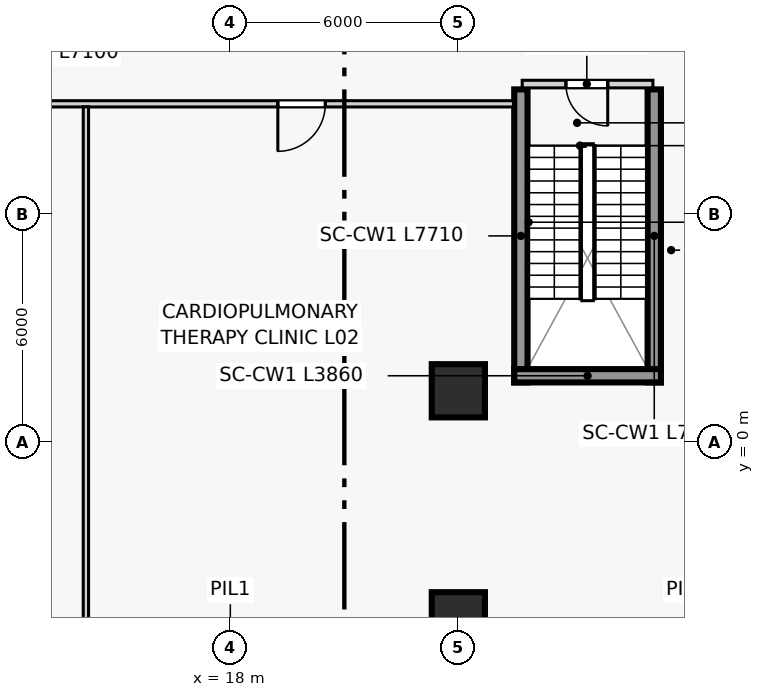
"""IFC4 building model, lengths in metres.
Left out: names, types, materials, properties, quantities, classifications, styles, units other than length and angle.
Written with IfcOpenShell. Run it as: python <this file> out.ifc"""

import sys

from ifc_helpers import new_model, si_unit, direction, frame, frame_2d, origin, origin_2d, place, context, subcontext, project, spatial, rectangle, extrude, source, transform, mapped, element, fill, save


model = new_model("IFC4")
c1 = context("Model", 3, precision=1e-05, world=origin(), true_north=direction((0.0, 1.0)))
c2 = subcontext(c1, "Body", "Model", "MODEL_VIEW")
j1 = project(units=[si_unit("LENGTHUNIT", "METRE"), si_unit("PLANEANGLEUNIT", "RADIAN")], contexts=[c1])
p1 = place(None, origin())
s1 = spatial("IfcSite", under=j1, at=p1, CompositionType="ELEMENT")
p2 = place(p1, origin())
s2 = spatial("IfcBuilding", under=s1, at=p2, CompositionType="ELEMENT")
p3 = place(p2, frame((0.0, 0.0, 9.0)))
s3 = spatial("IfcBuildingStorey", under=s2, at=p3, CompositionType="ELEMENT", Elevation=9.0)
for number, where, z_axis, x_axis in (
    (1, (25.645, 1.57, 0.0), (0.0, 0.0, 1.0), (0.0, 1.0, 0.0)),
    (2, (29.155, 1.57, 0.0), (0.0, 0.0, 1.0), (0.0, 1.0, 0.0)),
):
    element("IfcWall", number, at=place(p3, frame(where, z_axis=z_axis, x_axis=x_axis)), inside=s3, PredefinedType="SHEAR", context=c2, shape_type="SweptSolid", body=[
        extrude(rectangle(XDim=7.71, YDim=0.35, at=frame_2d((3.855, 0.0))), origin(), (0.0, 0.0, 1.0), 4.5),
    ])
p4 = place(p3, frame((25.47, 1.745, 0.0), z_axis=(0.0, 0.0, 1.0), x_axis=(1.0, 0.0, 0.0)))
e3 = element("IfcWall", 3, at=p4, inside=s3, PredefinedType="SHEAR", context=c2, shape_type="SweptSolid", body=[
    extrude(rectangle(XDim=3.86, YDim=0.35, at=frame_2d((1.93, 0.0))), origin(), (0.0, 0.0, 1.0), 4.5),
])
m1 = source(origin(), c2, "Body", "SweptSolid", [
    extrude(rectangle(XDim=1.4, YDim=1.4, at=origin_2d()), origin(), (0.0, 0.0, 1.0), 4.5),
])
for number, where, z_axis, x_axis in (
    (4, (24.0, -4.65, 0.0), (0.0, 0.0, 1.0), (1.0, 0.0, 0.0)),
    (5, (24.0, 1.35, 0.0), (0.0, 0.0, 1.0), (1.0, 0.0, 0.0)),
):
    element("IfcColumn", number, at=place(p3, frame(where, z_axis=z_axis, x_axis=x_axis)), inside=s3, PredefinedType="COLUMN", context=c2, shape_type="MappedRepresentation", body=[
        mapped(m1, transform((0.0, 0.0, 0.0), scale=1.0)),
    ])
p5 = place(p3, frame((25.68, 9.42, 0.0), z_axis=(0.0, 0.0, 1.0), x_axis=(1.0, 0.0, 0.0)))
e6 = element("IfcWall", 6, at=p5, inside=s3, PredefinedType="PARTITIONING", context=c2, shape_type="SweptSolid", body=[
    extrude(rectangle(XDim=3.44, YDim=0.2, at=frame_2d((1.72, 0.0))), origin(), (0.0, 0.0, 1.0), 4.16),
])
p6 = place(p5, frame((1.15, 0.0, 0.0)))
e7 = element("IfcOpeningElement", 7, at=p6, cuts=e6, PredefinedType="OPENING", context=c2, shape_type="SweptSolid", body=[
    extrude(rectangle(XDim=1.1, YDim=2.2, at=frame_2d((0.55, 1.1))), frame((0.0, 0.11, 0.0), z_axis=(0.0, -1.0, 0.0), x_axis=(1.0, 0.0, 0.0)), (0.0, 0.0, 1.0), 0.22),
])
p7 = place(p3, frame((0.185, 8.9, 0.0), z_axis=(0.0, 0.0, 1.0), x_axis=(1.0, 0.0, 0.0)))
e8 = element("IfcWall", 8, at=p7, inside=s3, PredefinedType="PARTITIONING", context=c2, shape_type="SweptSolid", body=[
    extrude(rectangle(XDim=25.265, YDim=0.165, at=frame_2d((12.632, 0.0))), origin(), (0.0, 0.0, 1.0), 4.16),
])
p8 = place(p7, frame((7.34, 0.0, 0.0)))
e9 = element("IfcOpeningElement", 9, at=p8, cuts=e8, PredefinedType="OPENING", context=c2, shape_type="SweptSolid", body=[
    extrude(rectangle(XDim=1.25, YDim=2.2, at=frame_2d((0.625, 1.1))), frame((0.0, 0.093, 0.0), z_axis=(0.0, -1.0, 0.0), x_axis=(1.0, 0.0, 0.0)), (0.0, 0.0, 1.0), 0.185),
])
p9 = place(p7, frame((19.065, 0.0, 0.0)))
e10 = element("IfcOpeningElement", 10, at=p9, cuts=e8, PredefinedType="OPENING", context=c2, shape_type="SweptSolid", body=[
    extrude(rectangle(XDim=1.25, YDim=2.2, at=frame_2d((0.625, 1.1))), frame((0.0, 0.093, 0.0), z_axis=(0.0, -1.0, 0.0), x_axis=(1.0, 0.0, 0.0)), (0.0, 0.0, 1.0), 0.185),
])
p10 = place(p3, frame((14.2, -5.815, 0.0), z_axis=(0.0, 0.0, 1.0), x_axis=(0.0, 1.0, 0.0)))
e11 = element("IfcWall", 11, at=p10, inside=s3, PredefinedType="PARTITIONING", context=c2, shape_type="SweptSolid", body=[
    extrude(rectangle(XDim=14.637, YDim=0.14, at=frame_2d((7.319, 0.0))), origin(), (0.0, 0.0, 1.0), 4.16),
])
m2 = source(origin(), c2, "Body", "SweptSolid", [
    extrude(rectangle(XDim=1.1, YDim=2.2, at=frame_2d((0.55, 1.1))), frame((0.0, 0.025, 0.0), z_axis=(0.0, -1.0, 0.0), x_axis=(1.0, 0.0, 0.0)), (0.0, 0.0, 1.0), 0.05),
])
p11 = place(p6, frame((1.1, 0.0, 0.0), z_axis=(0.0, 0.0, 1.0), x_axis=(-1.0, 0.0, 0.0)))
e12 = element("IfcDoor", 12, at=p11, inside=s3, OperationType="SINGLE_SWING_LEFT", PredefinedType="DOOR", context=c2, shape_type="MappedRepresentation", body=[
    mapped(m2, transform((0.0, 0.0, 0.0), scale=1.0)),
])
fill(e7, e12)
m3 = source(origin(), c2, "Body", "SweptSolid", [
    extrude(rectangle(XDim=1.25, YDim=2.2, at=frame_2d((0.625, 1.1))), frame((0.0, 0.025, 0.0), z_axis=(0.0, -1.0, 0.0), x_axis=(1.0, 0.0, 0.0)), (0.0, 0.0, 1.0), 0.05),
])
p12 = place(p9, frame((1.25, 0.0, 0.0), z_axis=(0.0, 0.0, 1.0), x_axis=(-1.0, 0.0, 0.0)))
e13 = element("IfcDoor", 13, at=p12, inside=s3, OperationType="SINGLE_SWING_RIGHT", PredefinedType="DOOR", context=c2, shape_type="MappedRepresentation", body=[
    mapped(m3, transform((0.0, 0.0, 0.0), scale=1.0)),
])
fill(e10, e13)
save(model, sys.argv[1])
